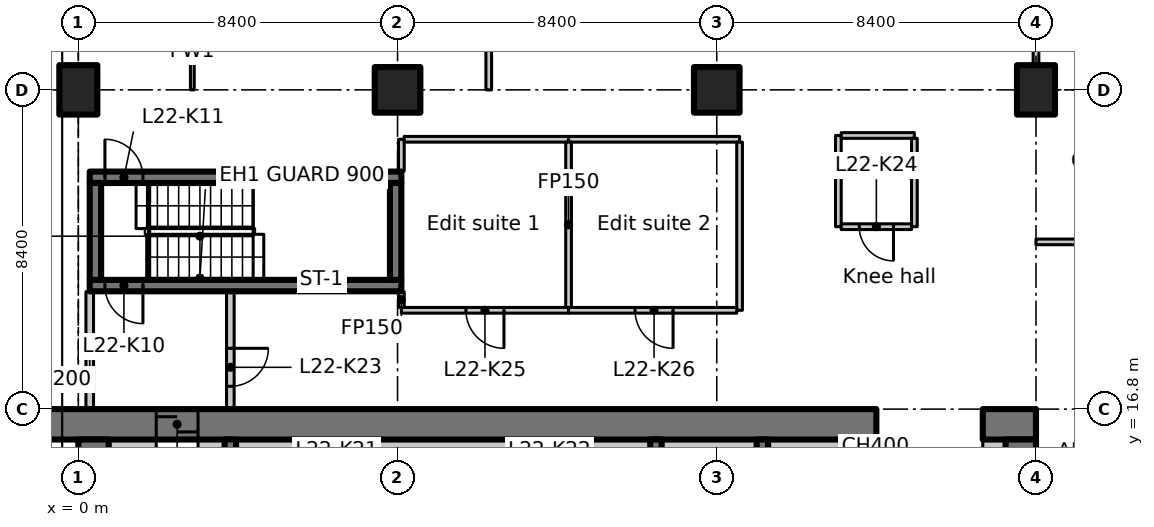
"""IFC4 building model, lengths in metres.
Left out: names, types, materials, properties, quantities, classifications, styles, units other than length and angle.
Written with IfcOpenShell. Run it as: python <this file> out.ifc"""

import sys

from ifc_helpers import new_model, si_unit, direction, frame, frame_2d, origin, origin_2d, place, context, subcontext, project, spatial, polyline, rectangle, outline, extrude, element, fill, save


model = new_model("IFC4")
c1 = context("Model", 3, precision=1e-05, world=origin(), true_north=direction((0.0, 1.0)))
c2 = subcontext(c1, "Body", "Model", "MODEL_VIEW")
j1 = project(units=[si_unit("LENGTHUNIT", "METRE"), si_unit("PLANEANGLEUNIT", "RADIAN")], contexts=[c1])
p1 = place(None, origin())
s1 = spatial("IfcSite", under=j1, at=p1, CompositionType="ELEMENT")
p2 = place(p1, origin())
s2 = spatial("IfcBuilding", under=s1, at=p2, CompositionType="ELEMENT")
p3 = place(p2, frame((0.0, 0.0, 95.3)))
s3 = spatial("IfcBuildingStorey", under=s2, at=p3, CompositionType="ELEMENT", Elevation=95.3)
p4 = place(p3, frame((0.0, 25.2, 0.0), z_axis=(0.0, 0.0, 1.0), x_axis=(1.0, 0.0, 0.0)))
e1 = element("IfcColumn", 1, at=p4, inside=s3, PredefinedType="COLUMN", context=c2, shape_type="SweptSolid", body=[
    extrude(rectangle(XDim=1.0, YDim=1.3, at=origin_2d()), origin(), (0.0, 0.0, 1.0), 3.35),
])
for number, where, z_axis, x_axis in (
    (2, (8.4, 25.2, 0.0), (0.0, 0.0, 1.0), (1.0, 0.0, 0.0)),
    (3, (16.8, 25.2, 0.0), (0.0, 0.0, 1.0), (1.0, 0.0, 0.0)),
):
    element("IfcColumn", number, at=place(p3, frame(where, z_axis=z_axis, x_axis=x_axis)), inside=s3, PredefinedType="COLUMN", context=c2, shape_type="SweptSolid", body=[
        extrude(rectangle(XDim=1.2, YDim=1.2, at=origin_2d()), origin(), (0.0, 0.0, 1.0), 3.35),
    ])
p5 = place(p3, frame((25.2, 25.2, 0.0), z_axis=(0.0, 0.0, 1.0), x_axis=(1.0, 0.0, 0.0)))
e4 = element("IfcColumn", 4, at=p5, inside=s3, PredefinedType="COLUMN", context=c2, shape_type="SweptSolid", body=[
    extrude(rectangle(XDim=1.0, YDim=1.3, at=origin_2d()), origin(), (0.0, 0.0, 1.0), 3.35),
])
p6 = place(p3, frame((-1.1, 16.4, 0.0), z_axis=(0.0, 0.0, 1.0), x_axis=(1.0, 0.0, 0.0)))
e5 = element("IfcWall", 5, at=p6, inside=s3, PredefinedType="SHEAR", context=c2, shape_type="SweptSolid", body=[
    extrude(rectangle(XDim=22.1, YDim=0.8, at=frame_2d((11.05, 0.0))), origin(), (0.0, 0.0, 1.0), 3.35),
])
p7 = place(p6, frame((3.15, 0.0, 0.0)))
e6 = element("IfcOpeningElement", 6, at=p7, cuts=e5, PredefinedType="OPENING", context=c2, shape_type="SweptSolid", body=[
    extrude(rectangle(XDim=1.1, YDim=2.3, at=frame_2d((0.55, 1.15))), frame((0.0, 0.41, 0.0), z_axis=(0.0, -1.0, 0.0), x_axis=(1.0, 0.0, 0.0)), (0.0, 0.0, 1.0), 0.82),
])
p8 = place(p3, frame((23.8, 16.4, 0.0), z_axis=(0.0, 0.0, 1.0), x_axis=(1.0, 0.0, 0.0)))
e7 = element("IfcWall", 7, at=p8, inside=s3, PredefinedType="SHEAR", context=c2, shape_type="SweptSolid", body=[
    extrude(rectangle(XDim=1.4, YDim=0.8, at=frame_2d((0.7, 0.0))), origin(), (0.0, 0.0, 1.0), 3.35),
])
p9 = place(p3, frame((0.4, 7.136, 0.0), z_axis=(0.0, 0.0, 1.0), x_axis=(0.0, 1.0, 0.0)))
e8 = element("IfcWall", 8, at=p9, inside=s3, PredefinedType="SHEAR", context=c2, shape_type="SweptSolid", body=[
    extrude(rectangle(XDim=8.864, YDim=0.8, at=frame_2d((4.432, 0.0))), origin(), (0.0, 0.0, 1.0), 3.35),
])
p10 = place(p3, frame((24.8, 12.6, 0.0), z_axis=(0.0, 0.0, 1.0), x_axis=(0.0, 1.0, 0.0)))
e9 = element("IfcWall", 9, at=p10, inside=s3, PredefinedType="SHEAR", context=c2, shape_type="SweptSolid", body=[
    extrude(rectangle(XDim=3.4, YDim=0.8, at=frame_2d((1.7, 0.0))), origin(), (0.0, 0.0, 1.0), 3.35),
])
p11 = place(p3, frame((0.8, 15.8, 0.0), z_axis=(0.0, 0.0, 1.0), x_axis=(1.0, 0.0, 0.0)))
e10 = element("IfcWall", 10, at=p11, inside=s3, PredefinedType="PARTITIONING", context=c2, shape_type="SweptSolid", body=[
    extrude(rectangle(XDim=1.25, YDim=0.4, at=frame_2d((0.625, 0.0))), origin(), (0.0, 0.0, 1.0), 3.35),
])
p12 = place(p3, frame((23.8, 15.8, 0.0), z_axis=(0.0, 0.0, 1.0), x_axis=(1.0, 0.0, 0.0)))
e11 = element("IfcWall", 11, at=p12, inside=s3, PredefinedType="PARTITIONING", context=c2, shape_type="SweptSolid", body=[
    extrude(rectangle(XDim=0.6, YDim=0.4, at=frame_2d((0.3, 0.0))), origin(), (0.0, 0.0, 1.0), 3.35),
])
for number, where, z_axis, x_axis in (
    (12, (4.0, 12.95, 0.0), (0.0, 0.0, 1.0), (0.0, 1.0, 0.0)),
    (13, (15.2, 12.95, 0.0), (0.0, 0.0, 1.0), (0.0, 1.0, 0.0)),
    (14, (18.0, 12.95, 0.0), (0.0, 0.0, 1.0), (0.0, 1.0, 0.0)),
    (15, (20.8, 12.95, 0.0), (0.0, 0.0, 1.0), (0.0, 1.0, 0.0)),
):
    element("IfcWall", number, at=place(p3, frame(where, z_axis=z_axis, x_axis=x_axis)), inside=s3, PredefinedType="SHEAR", context=c2, shape_type="SweptSolid", body=[
        extrude(rectangle(XDim=3.05, YDim=0.3, at=frame_2d((1.525, 0.0))), origin(), (0.0, 0.0, 1.0), 3.35),
    ])
p13 = place(p3, frame((8.5, 20.05, 0.0), z_axis=(0.0, 0.0, 1.0), x_axis=(-1.0, 0.0, 0.0)))
e16 = element("IfcWall", 16, at=p13, inside=s3, PredefinedType="SHEAR", context=c2, shape_type="SweptSolid", body=[
    extrude(rectangle(XDim=8.2, YDim=0.3, at=frame_2d((4.1, 0.0))), origin(), (0.0, 0.0, 1.0), 3.35),
])
p14 = place(p13, frame((6.8, 0.0, 0.0)))
e17 = element("IfcOpeningElement", 17, at=p14, cuts=e16, PredefinedType="OPENING", context=c2, shape_type="SweptSolid", body=[
    extrude(rectangle(XDim=1.0, YDim=2.1, at=frame_2d((0.5, 1.05))), frame((0.0, 0.16, 0.0), z_axis=(0.0, -1.0, 0.0), x_axis=(1.0, 0.0, 0.0)), (0.0, 0.0, 1.0), 0.32),
])
p15 = place(p3, frame((0.3, 22.9, 0.0), z_axis=(0.0, 0.0, 1.0), x_axis=(1.0, 0.0, 0.0)))
e18 = element("IfcWall", 18, at=p15, inside=s3, PredefinedType="SHEAR", context=c2, shape_type="SweptSolid", body=[
    extrude(rectangle(XDim=8.2, YDim=0.3, at=frame_2d((4.1, 0.0))), origin(), (0.0, 0.0, 1.0), 3.35),
])
p16 = place(p15, frame((0.4, 0.0, 0.0)))
e19 = element("IfcOpeningElement", 19, at=p16, cuts=e18, PredefinedType="OPENING", context=c2, shape_type="SweptSolid", body=[
    extrude(rectangle(XDim=1.0, YDim=2.1, at=frame_2d((0.5, 1.05))), frame((0.0, 0.16, 0.0), z_axis=(0.0, -1.0, 0.0), x_axis=(1.0, 0.0, 0.0)), (0.0, 0.0, 1.0), 0.32),
])
for number, where, z_axis, x_axis in (
    (20, (0.45, 20.2, 0.0), (0.0, 0.0, 1.0), (0.0, 1.0, 0.0)),
    (21, (8.35, 20.2, 0.0), (0.0, 0.0, 1.0), (0.0, 1.0, 0.0)),
):
    element("IfcWall", number, at=place(p3, frame(where, z_axis=z_axis, x_axis=x_axis)), inside=s3, PredefinedType="SHEAR", context=c2, shape_type="SweptSolid", body=[
        extrude(rectangle(XDim=2.55, YDim=0.3, at=frame_2d((1.275, 0.0))), origin(), (0.0, 0.0, 1.0), 3.35),
    ])
p17 = place(p3, frame((0.3, 16.812, 0.0), z_axis=(0.0, 0.0, 1.0), x_axis=(0.0, 1.0, 0.0)))
e22 = element("IfcWall", 22, at=p17, inside=s3, PredefinedType="PARTITIONING", context=c2, shape_type="SweptSolid", body=[
    extrude(rectangle(XDim=3.076, YDim=0.2, at=frame_2d((1.538, 0.0))), origin(), (0.0, 0.0, 1.0), 2.98),
])
p18 = place(p3, frame((4.0, 19.888, 0.0), z_axis=(0.0, 0.0, 1.0), x_axis=(0.0, -1.0, 0.0)))
e23 = element("IfcWall", 23, at=p18, inside=s3, PredefinedType="PARTITIONING", context=c2, shape_type="SweptSolid", body=[
    extrude(rectangle(XDim=3.076, YDim=0.2, at=frame_2d((1.538, 0.0))), origin(), (0.0, 0.0, 1.0), 3.35),
])
p19 = place(p18, frame((1.488, 0.0, 0.0)))
e24 = element("IfcOpeningElement", 24, at=p19, cuts=e23, PredefinedType="OPENING", context=c2, shape_type="SweptSolid", body=[
    extrude(rectangle(XDim=1.0, YDim=2.1, at=frame_2d((0.5, 1.05))), frame((0.0, 0.11, 0.0), z_axis=(0.0, -1.0, 0.0), x_axis=(1.0, 0.0, 0.0)), (0.0, 0.0, 1.0), 0.22),
])
p20 = place(p3, frame((12.9, 19.4, 0.0), z_axis=(0.0, 0.0, 1.0), x_axis=(-1.0, 0.0, 0.0)))
e25 = element("IfcWall", 25, at=p20, inside=s3, PredefinedType="PARTITIONING", context=c2, shape_type="SweptSolid", body=[
    extrude(rectangle(XDim=4.4, YDim=0.15, at=frame_2d((2.2, 0.0))), origin(), (0.0, 0.0, 1.0), 3.35),
])
p21 = place(p20, frame((1.7, 0.0, 0.0)))
e26 = element("IfcOpeningElement", 26, at=p21, cuts=e25, PredefinedType="OPENING", context=c2, shape_type="SweptSolid", body=[
    extrude(rectangle(XDim=1.0, YDim=2.1, at=frame_2d((0.5, 1.05))), frame((0.0, 0.085, 0.0), z_axis=(0.0, -1.0, 0.0), x_axis=(1.0, 0.0, 0.0)), (0.0, 0.0, 1.0), 0.17),
])
p22 = place(p3, frame((8.5, 19.475, 0.0), z_axis=(0.0, 0.0, 1.0), x_axis=(0.0, 1.0, 0.0)))
e27 = element("IfcWall", 27, at=p22, inside=s3, PredefinedType="PARTITIONING", context=c2, shape_type="SweptSolid", body=[
    extrude(rectangle(XDim=0.413, YDim=0.15, at=frame_2d((0.207, 0.0))), origin(), (0.0, 0.0, 1.0), 3.35),
])
p23 = place(p3, frame((8.5, 23.062, 0.0), z_axis=(0.0, 0.0, 1.0), x_axis=(0.0, 1.0, 0.0)))
e28 = element("IfcWall", 28, at=p23, inside=s3, PredefinedType="PARTITIONING", context=c2, shape_type="SweptSolid", body=[
    extrude(rectangle(XDim=0.838, YDim=0.15, at=frame_2d((0.419, 0.0))), origin(), (0.0, 0.0, 1.0), 3.35),
])
p24 = place(p3, frame((8.575, 23.9, 0.0), z_axis=(0.0, 0.0, 1.0), x_axis=(1.0, 0.0, 0.0)))
e29 = element("IfcWall", 29, at=p24, inside=s3, PredefinedType="PARTITIONING", context=c2, shape_type="SweptSolid", body=[
    extrude(rectangle(XDim=4.325, YDim=0.15, at=frame_2d((2.163, 0.0))), origin(), (0.0, 0.0, 1.0), 3.35),
])
p25 = place(p3, frame((12.9, 23.9, 0.0), z_axis=(0.0, 0.0, 1.0), x_axis=(1.0, 0.0, 0.0)))
e30 = element("IfcWall", 30, at=p25, inside=s3, PredefinedType="PARTITIONING", context=c2, shape_type="SweptSolid", body=[
    extrude(rectangle(XDim=4.5, YDim=0.15, at=frame_2d((2.25, 0.0))), origin(), (0.0, 0.0, 1.0), 3.35),
])
p26 = place(p3, frame((17.4, 23.825, 0.0), z_axis=(0.0, 0.0, 1.0), x_axis=(0.0, -1.0, 0.0)))
e31 = element("IfcWall", 31, at=p26, inside=s3, PredefinedType="PARTITIONING", context=c2, shape_type="SweptSolid", body=[
    extrude(rectangle(XDim=4.425, YDim=0.15, at=frame_2d((2.212, 0.0))), origin(), (0.0, 0.0, 1.0), 3.35),
])
p27 = place(p3, frame((17.325, 19.4, 0.0), z_axis=(0.0, 0.0, 1.0), x_axis=(-1.0, 0.0, 0.0)))
e32 = element("IfcWall", 32, at=p27, inside=s3, PredefinedType="PARTITIONING", context=c2, shape_type="SweptSolid", body=[
    extrude(rectangle(XDim=4.425, YDim=0.15, at=frame_2d((2.212, 0.0))), origin(), (0.0, 0.0, 1.0), 3.35),
])
p28 = place(p27, frame((1.675, 0.0, 0.0)))
e33 = element("IfcOpeningElement", 33, at=p28, cuts=e32, PredefinedType="OPENING", context=c2, shape_type="SweptSolid", body=[
    extrude(rectangle(XDim=1.0, YDim=2.1, at=frame_2d((0.5, 1.05))), frame((0.0, 0.085, 0.0), z_axis=(0.0, -1.0, 0.0), x_axis=(1.0, 0.0, 0.0)), (0.0, 0.0, 1.0), 0.17),
])
p29 = place(p3, frame((12.9, 23.825, 0.0), z_axis=(0.0, 0.0, 1.0), x_axis=(0.0, -1.0, 0.0)))
e34 = element("IfcWall", 34, at=p29, inside=s3, PredefinedType="PARTITIONING", context=c2, shape_type="SweptSolid", body=[
    extrude(rectangle(XDim=4.35, YDim=0.15, at=frame_2d((2.175, 0.0))), origin(), (0.0, 0.0, 1.0), 3.35),
])
p30 = place(p3, frame((20.0, 21.6, 0.0), z_axis=(0.0, 0.0, 1.0), x_axis=(0.0, 1.0, 0.0)))
e35 = element("IfcWall", 35, at=p30, inside=s3, PredefinedType="PARTITIONING", context=c2, shape_type="SweptSolid", body=[
    extrude(rectangle(XDim=2.4, YDim=0.15, at=frame_2d((1.2, 0.0))), origin(), (0.0, 0.0, 1.0), 3.35),
])
p31 = place(p3, frame((20.075, 24.0, 0.0), z_axis=(0.0, 0.0, 1.0), x_axis=(1.0, 0.0, 0.0)))
e36 = element("IfcWall", 36, at=p31, inside=s3, PredefinedType="PARTITIONING", context=c2, shape_type="SweptSolid", body=[
    extrude(rectangle(XDim=1.925, YDim=0.15, at=frame_2d((0.962, 0.0))), origin(), (0.0, 0.0, 1.0), 3.35),
])
p32 = place(p3, frame((22.0, 23.925, 0.0), z_axis=(0.0, 0.0, 1.0), x_axis=(0.0, -1.0, 0.0)))
e37 = element("IfcWall", 37, at=p32, inside=s3, PredefinedType="PARTITIONING", context=c2, shape_type="SweptSolid", body=[
    extrude(rectangle(XDim=2.325, YDim=0.15, at=frame_2d((1.163, 0.0))), origin(), (0.0, 0.0, 1.0), 3.35),
])
p33 = place(p3, frame((21.925, 21.6, 0.0), z_axis=(0.0, 0.0, 1.0), x_axis=(-1.0, 0.0, 0.0)))
e38 = element("IfcWall", 38, at=p33, inside=s3, PredefinedType="PARTITIONING", context=c2, shape_type="SweptSolid", body=[
    extrude(rectangle(XDim=1.85, YDim=0.15, at=frame_2d((0.925, 0.0))), origin(), (0.0, 0.0, 1.0), 3.35),
])
p34 = place(p33, frame((0.475, 0.0, 0.0)))
e39 = element("IfcOpeningElement", 39, at=p34, cuts=e38, PredefinedType="OPENING", context=c2, shape_type="SweptSolid", body=[
    extrude(rectangle(XDim=0.9, YDim=2.1, at=frame_2d((0.45, 1.05))), frame((0.0, 0.085, 0.0), z_axis=(0.0, -1.0, 0.0), x_axis=(1.0, 0.0, 0.0)), (0.0, 0.0, 1.0), 0.17),
])
p35 = place(p3, frame((3.15, 15.8, 0.0), z_axis=(0.0, 0.0, 1.0), x_axis=(1.0, 0.0, 0.0)))
e40 = element("IfcWall", 40, at=p35, inside=s3, PredefinedType="PARTITIONING", context=c2, shape_type="SweptSolid", body=[
    extrude(rectangle(XDim=0.7, YDim=0.4, at=frame_2d((0.35, 0.0))), origin(), (0.0, 0.0, 1.0), 3.35),
])
p36 = place(p3, frame((4.15, 15.8, 0.0), z_axis=(0.0, 0.0, 1.0), x_axis=(1.0, 0.0, 0.0)))
e41 = element("IfcWall", 41, at=p36, inside=s3, PredefinedType="PARTITIONING", context=c2, shape_type="SweptSolid", body=[
    extrude(rectangle(XDim=10.9, YDim=0.4, at=frame_2d((5.45, 0.0))), origin(), (0.0, 0.0, 1.0), 3.35),
])
for number, where, z_axis, x_axis in (
    (42, (15.35, 15.8, 0.0), (0.0, 0.0, 1.0), (1.0, 0.0, 0.0)),
    (43, (18.15, 15.8, 0.0), (0.0, 0.0, 1.0), (1.0, 0.0, 0.0)),
):
    element("IfcWall", number, at=place(p3, frame(where, z_axis=z_axis, x_axis=x_axis)), inside=s3, PredefinedType="PARTITIONING", context=c2, shape_type="SweptSolid", body=[
        extrude(rectangle(XDim=2.5, YDim=0.4, at=frame_2d((1.25, 0.0))), origin(), (0.0, 0.0, 1.0), 3.35),
    ])
p37 = place(p3, frame((20.95, 15.8, 0.0), z_axis=(0.0, 0.0, 1.0), x_axis=(1.0, 0.0, 0.0)))
e44 = element("IfcWall", 44, at=p37, inside=s3, PredefinedType="PARTITIONING", context=c2, shape_type="SweptSolid", body=[
    extrude(rectangle(XDim=0.05, YDim=0.4, at=frame_2d((0.025, 0.0))), origin(), (0.0, 0.0, 1.0), 3.35),
])
p38 = place(p3, frame((25.2, 21.2, 0.0), z_axis=(0.0, 0.0, 1.0), x_axis=(1.0, 0.0, 0.0)))
e45 = element("IfcWall", 45, at=p38, inside=s3, PredefinedType="PARTITIONING", context=c2, shape_type="SweptSolid", body=[
    extrude(rectangle(XDim=4.2, YDim=0.15, at=frame_2d((2.1, 0.0))), origin(), (0.0, 0.0, 1.0), 3.33),
])
p39 = place(p3, frame((25.2, 31.0, 0.0), z_axis=(0.0, 0.0, 1.0), x_axis=(0.0, -1.0, 0.0)))
e46 = element("IfcWall", 46, at=p39, inside=s3, PredefinedType="PARTITIONING", context=c2, shape_type="SweptSolid", body=[
    extrude(outline(polyline([(0.0, 0.0), (5.13, 0.0), (5.13, 2.98), (0.0, 2.98), (0.0, 0.0)])), frame((0.0, 0.075, 0.0), z_axis=(0.0, -1.0, 0.0), x_axis=(1.0, 0.0, 0.0)), (0.0, 0.0, 1.0), 0.15),
])
p40 = place(p39, frame((1.93, 0.0, 0.0)))
e47 = element("IfcOpeningElement", 47, at=p40, cuts=e46, PredefinedType="OPENING", context=c2, shape_type="SweptSolid", body=[
    extrude(rectangle(XDim=1.1, YDim=2.1, at=frame_2d((0.55, 1.05))), frame((0.0, 0.085, 0.0), z_axis=(0.0, -1.0, 0.0), x_axis=(1.0, 0.0, 0.0)), (0.0, 0.0, 1.0), 0.17),
])
p41 = place(p3, frame((10.8, 25.2, 0.0), z_axis=(0.0, 0.0, 1.0), x_axis=(0.0, 1.0, 0.0)))
e48 = element("IfcWall", 48, at=p41, inside=s3, PredefinedType="PARTITIONING", context=c2, shape_type="SweptSolid", body=[
    extrude(rectangle(XDim=4.2, YDim=0.15, at=frame_2d((2.1, 0.0))), origin(), (0.0, 0.0, 1.0), 3.33),
])
p42 = place(p3, frame((3.0, 29.4, 0.0), z_axis=(0.0, 0.0, 1.0), x_axis=(0.0, -1.0, 0.0)))
e49 = element("IfcWall", 49, at=p42, inside=s3, PredefinedType="PARTITIONING", context=c2, shape_type="SweptSolid", body=[
    extrude(rectangle(XDim=4.2, YDim=0.1, at=frame_2d((2.1, 0.0))), origin(), (0.0, 0.0, 1.0), 3.33),
])
p43 = place(p7, origin())
e50 = element("IfcDoor", 50, at=p43, inside=s3, OperationType="SLIDING_TO_LEFT", PredefinedType="DOOR", context=c2, shape_type="SweptSolid", body=[
    extrude(rectangle(XDim=1.1, YDim=2.3, at=frame_2d((0.55, 1.15))), frame((0.0, 0.025, 0.0), z_axis=(0.0, -1.0, 0.0), x_axis=(1.0, 0.0, 0.0)), (0.0, 0.0, 1.0), 0.05),
])
fill(e6, e50)
p44 = place(p14, origin())
e51 = element("IfcDoor", 51, at=p44, inside=s3, OperationType="SINGLE_SWING_LEFT", PredefinedType="DOOR", context=c2, shape_type="SweptSolid", body=[
    extrude(rectangle(XDim=1.0, YDim=2.1, at=frame_2d((0.5, 1.05))), frame((0.0, 0.025, 0.0), z_axis=(0.0, -1.0, 0.0), x_axis=(1.0, 0.0, 0.0)), (0.0, 0.0, 1.0), 0.05),
])
fill(e17, e51)
p45 = place(p16, origin())
e52 = element("IfcDoor", 52, at=p45, inside=s3, OperationType="SINGLE_SWING_RIGHT", PredefinedType="DOOR", context=c2, shape_type="SweptSolid", body=[
    extrude(rectangle(XDim=1.0, YDim=2.1, at=frame_2d((0.5, 1.05))), frame((0.0, 0.025, 0.0), z_axis=(0.0, -1.0, 0.0), x_axis=(1.0, 0.0, 0.0)), (0.0, 0.0, 1.0), 0.05),
])
fill(e19, e52)
p46 = place(p19, origin())
e53 = element("IfcDoor", 53, at=p46, inside=s3, OperationType="SINGLE_SWING_RIGHT", PredefinedType="DOOR", context=c2, shape_type="SweptSolid", body=[
    extrude(rectangle(XDim=1.0, YDim=2.1, at=frame_2d((0.5, 1.05))), frame((0.0, 0.025, 0.0), z_axis=(0.0, -1.0, 0.0), x_axis=(1.0, 0.0, 0.0)), (0.0, 0.0, 1.0), 0.05),
])
fill(e24, e53)
p47 = place(p34, origin())
e54 = element("IfcDoor", 54, at=p47, inside=s3, OperationType="SINGLE_SWING_LEFT", PredefinedType="DOOR", context=c2, shape_type="SweptSolid", body=[
    extrude(rectangle(XDim=0.9, YDim=2.1, at=frame_2d((0.45, 1.05))), frame((0.0, 0.025, 0.0), z_axis=(0.0, -1.0, 0.0), x_axis=(1.0, 0.0, 0.0)), (0.0, 0.0, 1.0), 0.05),
])
fill(e39, e54)
p48 = place(p21, origin())
e55 = element("IfcDoor", 55, at=p48, inside=s3, OperationType="SINGLE_SWING_RIGHT", PredefinedType="DOOR", context=c2, shape_type="SweptSolid", body=[
    extrude(rectangle(XDim=1.0, YDim=2.1, at=frame_2d((0.5, 1.05))), frame((0.0, 0.025, 0.0), z_axis=(0.0, -1.0, 0.0), x_axis=(1.0, 0.0, 0.0)), (0.0, 0.0, 1.0), 0.05),
])
fill(e26, e55)
p49 = place(p28, origin())
e56 = element("IfcDoor", 56, at=p49, inside=s3, OperationType="SINGLE_SWING_LEFT", PredefinedType="DOOR", context=c2, shape_type="SweptSolid", body=[
    extrude(rectangle(XDim=1.0, YDim=2.1, at=frame_2d((0.5, 1.05))), frame((0.0, 0.025, 0.0), z_axis=(0.0, -1.0, 0.0), x_axis=(1.0, 0.0, 0.0)), (0.0, 0.0, 1.0), 0.05),
])
fill(e33, e56)
save(model, sys.argv[1])
